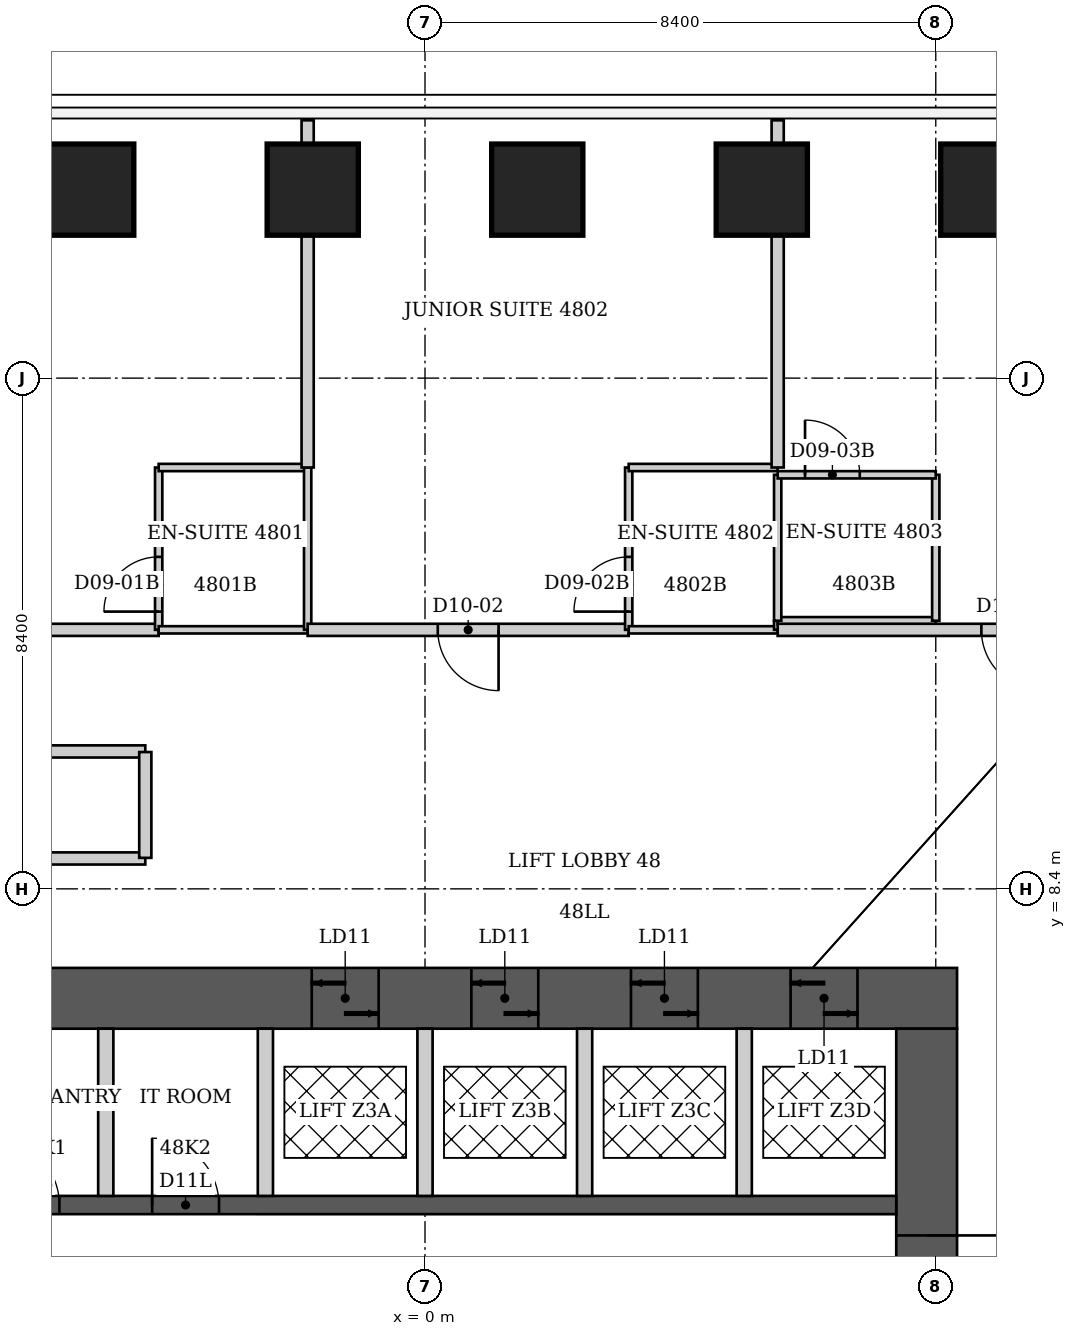
"""IFC4 building model, lengths in metres.
Left out: names, types, materials, properties, quantities, classifications, styles, units other than length and angle.
Written with IfcOpenShell. Run it as: python <this file> out.ifc"""

import sys

from ifc_helpers import new_model, si_unit, direction, frame, frame_2d, origin, origin_2d, place, context, subcontext, project, spatial, rectangle, extrude, element, fill, save


model = new_model("IFC4")
c1 = context("Model", 3, precision=1e-05, world=origin(), true_north=direction((0.0, 1.0)))
c2 = subcontext(c1, "Body", "Model", "MODEL_VIEW")
j1 = project(units=[si_unit("LENGTHUNIT", "METRE"), si_unit("PLANEANGLEUNIT", "RADIAN")], contexts=[c1])
p1 = place(None, origin())
s1 = spatial("IfcSite", under=j1, at=p1, CompositionType="ELEMENT")
p2 = place(p1, origin())
s2 = spatial("IfcBuilding", under=s1, at=p2, CompositionType="ELEMENT")
p3 = place(p2, frame((0.0, 0.0, 194.6)))
s3 = spatial("IfcBuildingStorey", under=s2, at=p3, CompositionType="ELEMENT", Elevation=194.6)
for number, where, z_axis, x_axis in (
    (1, (-5.539, 19.9, 0.0), (0.0, 0.0, 1.0), (0.0, 1.0, 0.0)),
    (2, (-1.846, 19.9, 0.0), (0.0, 0.0, 1.0), (0.0, 1.0, 0.0)),
    (3, (1.846, 19.9, 0.0), (0.0, 0.0, 1.0), (0.0, 1.0, 0.0)),
    (4, (5.539, 19.9, 0.0), (0.0, 0.0, 1.0), (0.0, 1.0, 0.0)),
    (5, (9.231, 19.9, 0.0), (0.0, 0.0, 1.0), (0.0, 1.0, 0.0)),
):
    element("IfcColumn", number, at=place(p3, frame(where, z_axis=z_axis, x_axis=x_axis)), inside=s3, PredefinedType="COLUMN", context=c2, shape_type="SweptSolid", body=[
        extrude(rectangle(XDim=1.5, YDim=1.5, at=origin_2d()), origin(), (0.0, 0.0, 1.0), 3.8),
    ])
p4 = place(p3, frame((-8.75, 6.6, 0.0), z_axis=(0.0, 0.0, 1.0), x_axis=(1.0, 0.0, 0.0)))
e6 = element("IfcWall", 6, at=p4, inside=s3, PredefinedType="SHEAR", context=c2, shape_type="SweptSolid", body=[
    extrude(rectangle(XDim=17.5, YDim=1.0, at=frame_2d((8.75, 0.0))), origin(), (0.0, 0.0, 1.0), 3.8),
])
p5 = place(p4, frame((6.887, 0.0, 0.0)))
e7 = element("IfcOpeningElement", 7, at=p5, cuts=e6, PredefinedType="OPENING", context=c2, shape_type="SweptSolid", body=[
    extrude(rectangle(XDim=1.1, YDim=2.1, at=frame_2d((0.55, 1.05))), frame((0.0, 0.5, 0.0), z_axis=(0.0, -1.0, 0.0), x_axis=(1.0, 0.0, 0.0)), (0.0, 0.0, 1.0), 1.0),
])
p6 = place(p4, frame((9.512, 0.0, 0.0)))
e8 = element("IfcOpeningElement", 8, at=p6, cuts=e6, PredefinedType="OPENING", context=c2, shape_type="SweptSolid", body=[
    extrude(rectangle(XDim=1.1, YDim=2.1, at=frame_2d((0.55, 1.05))), frame((0.0, 0.5, 0.0), z_axis=(0.0, -1.0, 0.0), x_axis=(1.0, 0.0, 0.0)), (0.0, 0.0, 1.0), 1.0),
])
p7 = place(p4, frame((12.137, 0.0, 0.0)))
e9 = element("IfcOpeningElement", 9, at=p7, cuts=e6, PredefinedType="OPENING", context=c2, shape_type="SweptSolid", body=[
    extrude(rectangle(XDim=1.1, YDim=2.1, at=frame_2d((0.55, 1.05))), frame((0.0, 0.5, 0.0), z_axis=(0.0, -1.0, 0.0), x_axis=(1.0, 0.0, 0.0)), (0.0, 0.0, 1.0), 1.0),
])
p8 = place(p4, frame((14.762, 0.0, 0.0)))
e10 = element("IfcOpeningElement", 10, at=p8, cuts=e6, PredefinedType="OPENING", context=c2, shape_type="SweptSolid", body=[
    extrude(rectangle(XDim=1.1, YDim=2.1, at=frame_2d((0.55, 1.05))), frame((0.0, 0.5, 0.0), z_axis=(0.0, -1.0, 0.0), x_axis=(1.0, 0.0, 0.0)), (0.0, 0.0, 1.0), 1.0),
])
p9 = place(p3, frame((8.25, -6.1, 0.0), z_axis=(0.0, 0.0, 1.0), x_axis=(0.0, 1.0, 0.0)))
e11 = element("IfcWall", 11, at=p9, inside=s3, PredefinedType="SHEAR", context=c2, shape_type="SweptSolid", body=[
    extrude(rectangle(XDim=12.2, YDim=1.0, at=frame_2d((6.1, 0.0))), origin(), (0.0, 0.0, 1.0), 3.8),
])
p10 = place(p9, frame((7.6, 0.0, 0.0)))
e12 = element("IfcOpeningElement", 12, at=p10, cuts=e11, PredefinedType="OPENING", context=c2, shape_type="SweptSolid", body=[
    extrude(rectangle(XDim=1.2, YDim=2.2, at=frame_2d((0.6, 1.1))), frame((0.0, 0.5, 0.0), z_axis=(0.0, -1.0, 0.0), x_axis=(1.0, 0.0, 0.0)), (0.0, 0.0, 1.0), 1.0),
])
p11 = place(p3, frame((-7.75, 3.2, 0.0), z_axis=(0.0, 0.0, 1.0), x_axis=(1.0, 0.0, 0.0)))
e13 = element("IfcWall", 13, at=p11, inside=s3, PredefinedType="SHEAR", context=c2, shape_type="SweptSolid", body=[
    extrude(rectangle(XDim=15.5, YDim=0.3, at=frame_2d((7.75, 0.0))), origin(), (0.0, 0.0, 1.0), 3.8),
])
p12 = place(p11, frame((0.637, 0.0, 0.0)))
e14 = element("IfcOpeningElement", 14, at=p12, cuts=e13, PredefinedType="OPENING", context=c2, shape_type="SweptSolid", body=[
    extrude(rectangle(XDim=1.1, YDim=2.2, at=frame_2d((0.55, 1.1))), frame((0.0, 0.15, 0.0), z_axis=(0.0, -1.0, 0.0), x_axis=(1.0, 0.0, 0.0)), (0.0, 0.0, 1.0), 0.3),
])
p13 = place(p11, frame((3.262, 0.0, 0.0)))
e15 = element("IfcOpeningElement", 15, at=p13, cuts=e13, PredefinedType="OPENING", context=c2, shape_type="SweptSolid", body=[
    extrude(rectangle(XDim=1.1, YDim=2.2, at=frame_2d((0.55, 1.1))), frame((0.0, 0.15, 0.0), z_axis=(0.0, -1.0, 0.0), x_axis=(1.0, 0.0, 0.0)), (0.0, 0.0, 1.0), 0.3),
])
for number, where, z_axis, x_axis in (
    (16, (-5.25, 3.35, 0.0), (0.0, 0.0, 1.0), (0.0, 1.0, 0.0)),
    (17, (-2.625, 3.35, 0.0), (0.0, 0.0, 1.0), (0.0, 1.0, 0.0)),
    (18, (0.0, 3.35, 0.0), (0.0, 0.0, 1.0), (0.0, 1.0, 0.0)),
    (19, (2.625, 3.35, 0.0), (0.0, 0.0, 1.0), (0.0, 1.0, 0.0)),
    (20, (5.25, 3.35, 0.0), (0.0, 0.0, 1.0), (0.0, 1.0, 0.0)),
):
    element("IfcWall", number, at=place(p3, frame(where, z_axis=z_axis, x_axis=x_axis)), inside=s3, PredefinedType="PARTITIONING", context=c2, shape_type="SweptSolid", body=[
        extrude(rectangle(XDim=2.75, YDim=0.25, at=frame_2d((1.375, 0.0))), origin(), (0.0, 0.0, 1.0), 3.8),
    ])
p14 = place(p3, frame((-12.35, 10.66, 0.0), z_axis=(0.0, 0.0, 1.0), x_axis=(1.0, 0.0, 0.0)))
e21 = element("IfcWall", 21, at=p14, inside=s3, PredefinedType="PARTITIONING", context=c2, shape_type="SweptSolid", body=[
    extrude(rectangle(XDim=7.75, YDim=0.2, at=frame_2d((3.875, 0.0))), origin(), (0.0, 0.0, 1.0), 3.64),
])
p15 = place(p14, frame((3.325, 0.0, 0.0)))
e22 = element("IfcOpeningElement", 22, at=p15, cuts=e21, PredefinedType="OPENING", context=c2, shape_type="SweptSolid", body=[
    extrude(rectangle(XDim=1.1, YDim=2.2, at=frame_2d((0.55, 1.1))), frame((0.0, 0.1, 0.0), z_axis=(0.0, -1.0, 0.0), x_axis=(1.0, 0.0, 0.0)), (0.0, 0.0, 1.0), 0.2),
])
p16 = place(p3, frame((-4.6, 8.9, 0.0), z_axis=(0.0, 0.0, 1.0), x_axis=(-1.0, 0.0, 0.0)))
e23 = element("IfcWall", 23, at=p16, inside=s3, PredefinedType="PARTITIONING", context=c2, shape_type="SweptSolid", body=[
    extrude(rectangle(XDim=5.95, YDim=0.2, at=frame_2d((2.975, 0.0))), origin(), (0.0, 0.0, 1.0), 3.64),
])
p17 = place(p3, frame((-4.6, 10.65, 0.0), z_axis=(0.0, 0.0, 1.0), x_axis=(0.0, -1.0, 0.0)))
e24 = element("IfcWall", 24, at=p17, inside=s3, PredefinedType="PARTITIONING", context=c2, shape_type="SweptSolid", body=[
    extrude(rectangle(XDim=1.74, YDim=0.2, at=frame_2d((0.87, 0.0))), origin(), (0.0, 0.0, 1.0), 3.64),
])
p18 = place(p3, frame((-4.38, 12.66, 0.0), z_axis=(0.0, 0.0, 1.0), x_axis=(-1.0, 0.0, 0.0)))
e25 = element("IfcWall", 25, at=p18, inside=s3, PredefinedType="PARTITIONING", context=c2, shape_type="SweptSolid", body=[
    extrude(rectangle(XDim=6.58, YDim=0.2, at=frame_2d((3.29, 0.0))), origin(), (0.0, 0.0, 1.0), 3.64),
])
p19 = place(p18, frame((2.79, 0.0, 0.0)))
e26 = element("IfcOpeningElement", 26, at=p19, cuts=e25, PredefinedType="OPENING", context=c2, shape_type="SweptSolid", body=[
    extrude(rectangle(XDim=1.0, YDim=2.13, at=frame_2d((0.5, 1.065))), frame((0.0, 0.1, 0.0), z_axis=(0.0, -1.0, 0.0), x_axis=(1.0, 0.0, 0.0)), (0.0, 0.0, 1.0), 0.2),
])
p20 = place(p3, frame((-4.38, 15.33, 0.0), z_axis=(0.0, 0.0, 1.0), x_axis=(0.0, -1.0, 0.0)))
e27 = element("IfcWall", 27, at=p20, inside=s3, PredefinedType="PARTITIONING", context=c2, shape_type="SweptSolid", body=[
    extrude(rectangle(XDim=2.67, YDim=0.12, at=frame_2d((1.335, 0.0))), origin(), (0.0, 0.0, 1.0), 3.64),
])
p21 = place(p20, frame((1.47, 0.0, 0.0)))
e28 = element("IfcOpeningElement", 28, at=p21, cuts=e27, PredefinedType="OPENING", context=c2, shape_type="SweptSolid", body=[
    extrude(rectangle(XDim=0.9, YDim=2.03, at=frame_2d((0.45, 1.015))), frame((0.0, 0.06, 0.0), z_axis=(0.0, -1.0, 0.0), x_axis=(1.0, 0.0, 0.0)), (0.0, 0.0, 1.0), 0.12),
])
for number, where, z_axis, x_axis in (
    (29, (-1.93, 12.66, 0.0), (0.0, 0.0, 1.0), (-1.0, 0.0, 0.0)),
    (30, (-1.93, 15.33, 0.0), (0.0, 0.0, 1.0), (-1.0, 0.0, 0.0)),
):
    element("IfcWall", number, at=place(p3, frame(where, z_axis=z_axis, x_axis=x_axis)), inside=s3, PredefinedType="PARTITIONING", context=c2, shape_type="SweptSolid", body=[
        extrude(rectangle(XDim=2.45, YDim=0.12, at=frame_2d((1.225, 0.0))), origin(), (0.0, 0.0, 1.0), 3.64),
    ])
p22 = place(p3, frame((-1.93, 15.33, 0.0), z_axis=(0.0, 0.0, 1.0), x_axis=(0.0, -1.0, 0.0)))
e31 = element("IfcWall", 31, at=p22, inside=s3, PredefinedType="PARTITIONING", context=c2, shape_type="SweptSolid", body=[
    extrude(rectangle(XDim=2.67, YDim=0.12, at=frame_2d((1.335, 0.0))), origin(), (0.0, 0.0, 1.0), 3.023),
])
p23 = place(p3, frame((-1.93, 21.04, 0.0), z_axis=(0.0, 0.0, 1.0), x_axis=(0.0, -1.0, 0.0)))
e32 = element("IfcWall", 32, at=p23, inside=s3, PredefinedType="PARTITIONING", context=c2, shape_type="SweptSolid", body=[
    extrude(rectangle(XDim=5.71, YDim=0.2, at=frame_2d((2.855, 0.0))), origin(), (0.0, 0.0, 1.0), 3.023),
])
p24 = place(p3, frame((3.35, 12.66, 0.0), z_axis=(0.0, 0.0, 1.0), x_axis=(-1.0, 0.0, 0.0)))
e33 = element("IfcWall", 33, at=p24, inside=s3, PredefinedType="PARTITIONING", context=c2, shape_type="SweptSolid", body=[
    extrude(rectangle(XDim=5.28, YDim=0.2, at=frame_2d((2.64, 0.0))), origin(), (0.0, 0.0, 1.0), 3.64),
])
p25 = place(p24, frame((2.14, 0.0, 0.0)))
e34 = element("IfcOpeningElement", 34, at=p25, cuts=e33, PredefinedType="OPENING", context=c2, shape_type="SweptSolid", body=[
    extrude(rectangle(XDim=1.0, YDim=2.13, at=frame_2d((0.5, 1.065))), frame((0.0, 0.1, 0.0), z_axis=(0.0, -1.0, 0.0), x_axis=(1.0, 0.0, 0.0)), (0.0, 0.0, 1.0), 0.2),
])
p26 = place(p3, frame((3.35, 15.33, 0.0), z_axis=(0.0, 0.0, 1.0), x_axis=(0.0, -1.0, 0.0)))
e35 = element("IfcWall", 35, at=p26, inside=s3, PredefinedType="PARTITIONING", context=c2, shape_type="SweptSolid", body=[
    extrude(rectangle(XDim=2.67, YDim=0.12, at=frame_2d((1.335, 0.0))), origin(), (0.0, 0.0, 1.0), 3.64),
])
p27 = place(p26, frame((1.47, 0.0, 0.0)))
e36 = element("IfcOpeningElement", 36, at=p27, cuts=e35, PredefinedType="OPENING", context=c2, shape_type="SweptSolid", body=[
    extrude(rectangle(XDim=0.9, YDim=2.03, at=frame_2d((0.45, 1.015))), frame((0.0, 0.06, 0.0), z_axis=(0.0, -1.0, 0.0), x_axis=(1.0, 0.0, 0.0)), (0.0, 0.0, 1.0), 0.12),
])
p28 = place(p3, frame((5.8, 12.66, 0.0), z_axis=(0.0, 0.0, 1.0), x_axis=(-1.0, 0.0, 0.0)))
e37 = element("IfcWall", 37, at=p28, inside=s3, PredefinedType="PARTITIONING", context=c2, shape_type="SweptSolid", body=[
    extrude(rectangle(XDim=2.45, YDim=0.12, at=frame_2d((1.225, 0.0))), origin(), (0.0, 0.0, 1.0), 3.64),
])
p29 = place(p3, frame((5.8, 12.81, 0.0), z_axis=(0.0, 0.0, 1.0), x_axis=(0.0, -1.0, 0.0)))
e38 = element("IfcWall", 38, at=p29, inside=s3, PredefinedType="PARTITIONING", context=c2, shape_type="SweptSolid", body=[
    extrude(rectangle(XDim=0.15, YDim=0.12, at=frame_2d((0.075, 0.0))), origin(), (0.0, 0.0, 1.0), 3.64),
])
p30 = place(p3, frame((5.8, 12.81, 0.0), z_axis=(0.0, 0.0, 1.0), x_axis=(1.0, 0.0, 0.0)))
e39 = element("IfcWall", 39, at=p30, inside=s3, PredefinedType="PARTITIONING", context=c2, shape_type="SweptSolid", body=[
    extrude(rectangle(XDim=2.6, YDim=0.12, at=frame_2d((1.3, 0.0))), origin(), (0.0, 0.0, 1.0), 3.64),
])
p31 = place(p3, frame((5.8, 15.21, 0.0), z_axis=(0.0, 0.0, 1.0), x_axis=(0.0, -1.0, 0.0)))
e40 = element("IfcWall", 40, at=p31, inside=s3, PredefinedType="PARTITIONING", context=c2, shape_type="SweptSolid", body=[
    extrude(rectangle(XDim=2.4, YDim=0.12, at=frame_2d((1.2, 0.0))), origin(), (0.0, 0.0, 1.0), 3.64),
])
p32 = place(p3, frame((5.8, 15.33, 0.0), z_axis=(0.0, 0.0, 1.0), x_axis=(-1.0, 0.0, 0.0)))
e41 = element("IfcWall", 41, at=p32, inside=s3, PredefinedType="PARTITIONING", context=c2, shape_type="SweptSolid", body=[
    extrude(rectangle(XDim=2.45, YDim=0.12, at=frame_2d((1.225, 0.0))), origin(), (0.0, 0.0, 1.0), 3.64),
])
p33 = place(p3, frame((5.8, 21.04, 0.0), z_axis=(0.0, 0.0, 1.0), x_axis=(0.0, -1.0, 0.0)))
e42 = element("IfcWall", 42, at=p33, inside=s3, PredefinedType="PARTITIONING", context=c2, shape_type="SweptSolid", body=[
    extrude(rectangle(XDim=5.71, YDim=0.2, at=frame_2d((2.855, 0.0))), origin(), (0.0, 0.0, 1.0), 3.64),
])
p34 = place(p3, frame((8.4, 12.81, 0.0), z_axis=(0.0, 0.0, 1.0), x_axis=(0.0, 1.0, 0.0)))
e43 = element("IfcWall", 43, at=p34, inside=s3, PredefinedType="PARTITIONING", context=c2, shape_type="SweptSolid", body=[
    extrude(rectangle(XDim=2.4, YDim=0.12, at=frame_2d((1.2, 0.0))), origin(), (0.0, 0.0, 1.0), 3.64),
])
p35 = place(p3, frame((8.4, 15.21, 0.0), z_axis=(0.0, 0.0, 1.0), x_axis=(-1.0, 0.0, 0.0)))
e44 = element("IfcWall", 44, at=p35, inside=s3, PredefinedType="PARTITIONING", context=c2, shape_type="SweptSolid", body=[
    extrude(rectangle(XDim=2.6, YDim=0.12, at=frame_2d((1.3, 0.0))), origin(), (0.0, 0.0, 1.0), 3.64),
])
p36 = place(p35, frame((1.25, 0.0, 0.0)))
e45 = element("IfcOpeningElement", 45, at=p36, cuts=e44, PredefinedType="OPENING", context=c2, shape_type="SweptSolid", body=[
    extrude(rectangle(XDim=0.9, YDim=2.03, at=frame_2d((0.45, 1.015))), frame((0.0, 0.06, 0.0), z_axis=(0.0, -1.0, 0.0), x_axis=(1.0, 0.0, 0.0)), (0.0, 0.0, 1.0), 0.12),
])
p37 = place(p3, frame((13.5, 12.66, 0.0), z_axis=(0.0, 0.0, 1.0), x_axis=(-1.0, 0.0, 0.0)))
e46 = element("IfcWall", 46, at=p37, inside=s3, PredefinedType="PARTITIONING", context=c2, shape_type="SweptSolid", body=[
    extrude(rectangle(XDim=7.7, YDim=0.2, at=frame_2d((3.85, 0.0))), origin(), (0.0, 0.0, 1.0), 3.64),
])
p38 = place(p37, frame((3.35, 0.0, 0.0)))
e47 = element("IfcOpeningElement", 47, at=p38, cuts=e46, PredefinedType="OPENING", context=c2, shape_type="SweptSolid", body=[
    extrude(rectangle(XDim=1.0, YDim=2.13, at=frame_2d((0.5, 1.065))), frame((0.0, 0.1, 0.0), z_axis=(0.0, -1.0, 0.0), x_axis=(1.0, 0.0, 0.0)), (0.0, 0.0, 1.0), 0.2),
])
p39 = place(p21, origin())
e48 = element("IfcDoor", 48, at=p39, inside=s3, OperationType="SINGLE_SWING_RIGHT", PredefinedType="DOOR", context=c2, shape_type="SweptSolid", body=[
    extrude(rectangle(XDim=0.9, YDim=2.03, at=frame_2d((0.45, 1.015))), frame((0.0, 0.025, 0.0), z_axis=(0.0, -1.0, 0.0), x_axis=(1.0, 0.0, 0.0)), (0.0, 0.0, 1.0), 0.05),
])
fill(e28, e48)
p40 = place(p25, origin())
e49 = element("IfcDoor", 49, at=p40, inside=s3, OperationType="SINGLE_SWING_LEFT", PredefinedType="DOOR", context=c2, shape_type="SweptSolid", body=[
    extrude(rectangle(XDim=1.0, YDim=2.13, at=frame_2d((0.5, 1.065))), frame((0.0, 0.025, 0.0), z_axis=(0.0, -1.0, 0.0), x_axis=(1.0, 0.0, 0.0)), (0.0, 0.0, 1.0), 0.05),
])
fill(e34, e49)
p41 = place(p27, origin())
e50 = element("IfcDoor", 50, at=p41, inside=s3, OperationType="SINGLE_SWING_RIGHT", PredefinedType="DOOR", context=c2, shape_type="SweptSolid", body=[
    extrude(rectangle(XDim=0.9, YDim=2.03, at=frame_2d((0.45, 1.015))), frame((0.0, 0.025, 0.0), z_axis=(0.0, -1.0, 0.0), x_axis=(1.0, 0.0, 0.0)), (0.0, 0.0, 1.0), 0.05),
])
fill(e36, e50)
p42 = place(p38, origin())
e51 = element("IfcDoor", 51, at=p42, inside=s3, OperationType="SINGLE_SWING_LEFT", PredefinedType="DOOR", context=c2, shape_type="SweptSolid", body=[
    extrude(rectangle(XDim=1.0, YDim=2.13, at=frame_2d((0.5, 1.065))), frame((0.0, 0.025, 0.0), z_axis=(0.0, -1.0, 0.0), x_axis=(1.0, 0.0, 0.0)), (0.0, 0.0, 1.0), 0.05),
])
fill(e47, e51)
p43 = place(p36, origin())
e52 = element("IfcDoor", 52, at=p43, inside=s3, OperationType="SINGLE_SWING_RIGHT", PredefinedType="DOOR", context=c2, shape_type="SweptSolid", body=[
    extrude(rectangle(XDim=0.9, YDim=2.03, at=frame_2d((0.45, 1.015))), frame((0.0, 0.025, 0.0), z_axis=(0.0, -1.0, 0.0), x_axis=(1.0, 0.0, 0.0)), (0.0, 0.0, 1.0), 0.05),
])
fill(e45, e52)
p44 = place(p10, origin())
e53 = element("IfcDoor", 53, at=p44, inside=s3, OperationType="SINGLE_SWING_RIGHT", PredefinedType="DOOR", context=c2, shape_type="SweptSolid", body=[
    extrude(rectangle(XDim=1.2, YDim=2.2, at=frame_2d((0.6, 1.1))), frame((0.0, 0.025, 0.0), z_axis=(0.0, -1.0, 0.0), x_axis=(1.0, 0.0, 0.0)), (0.0, 0.0, 1.0), 0.05),
])
fill(e12, e53)
p45 = place(p12, origin())
e54 = element("IfcDoor", 54, at=p45, inside=s3, OperationType="SINGLE_SWING_LEFT", PredefinedType="DOOR", context=c2, shape_type="SweptSolid", body=[
    extrude(rectangle(XDim=1.1, YDim=2.2, at=frame_2d((0.55, 1.1))), frame((0.0, 0.025, 0.0), z_axis=(0.0, -1.0, 0.0), x_axis=(1.0, 0.0, 0.0)), (0.0, 0.0, 1.0), 0.05),
])
fill(e14, e54)
p46 = place(p13, origin())
e55 = element("IfcDoor", 55, at=p46, inside=s3, OperationType="SINGLE_SWING_LEFT", PredefinedType="DOOR", context=c2, shape_type="SweptSolid", body=[
    extrude(rectangle(XDim=1.1, YDim=2.2, at=frame_2d((0.55, 1.1))), frame((0.0, 0.025, 0.0), z_axis=(0.0, -1.0, 0.0), x_axis=(1.0, 0.0, 0.0)), (0.0, 0.0, 1.0), 0.05),
])
fill(e15, e55)
p47 = place(p5, origin())
e56 = element("IfcDoor", 56, at=p47, inside=s3, OperationType="DOUBLE_DOOR_SLIDING", PredefinedType="DOOR", context=c2, shape_type="SweptSolid", body=[
    extrude(rectangle(XDim=1.1, YDim=2.1, at=frame_2d((0.55, 1.05))), frame((0.0, 0.025, 0.0), z_axis=(0.0, -1.0, 0.0), x_axis=(1.0, 0.0, 0.0)), (0.0, 0.0, 1.0), 0.05),
])
fill(e7, e56)
p48 = place(p6, origin())
e57 = element("IfcDoor", 57, at=p48, inside=s3, OperationType="DOUBLE_DOOR_SLIDING", PredefinedType="DOOR", context=c2, shape_type="SweptSolid", body=[
    extrude(rectangle(XDim=1.1, YDim=2.1, at=frame_2d((0.55, 1.05))), frame((0.0, 0.025, 0.0), z_axis=(0.0, -1.0, 0.0), x_axis=(1.0, 0.0, 0.0)), (0.0, 0.0, 1.0), 0.05),
])
fill(e8, e57)
p49 = place(p7, origin())
e58 = element("IfcDoor", 58, at=p49, inside=s3, OperationType="DOUBLE_DOOR_SLIDING", PredefinedType="DOOR", context=c2, shape_type="SweptSolid", body=[
    extrude(rectangle(XDim=1.1, YDim=2.1, at=frame_2d((0.55, 1.05))), frame((0.0, 0.025, 0.0), z_axis=(0.0, -1.0, 0.0), x_axis=(1.0, 0.0, 0.0)), (0.0, 0.0, 1.0), 0.05),
])
fill(e9, e58)
p50 = place(p8, origin())
e59 = element("IfcDoor", 59, at=p50, inside=s3, OperationType="DOUBLE_DOOR_SLIDING", PredefinedType="DOOR", context=c2, shape_type="SweptSolid", body=[
    extrude(rectangle(XDim=1.1, YDim=2.1, at=frame_2d((0.55, 1.05))), frame((0.0, 0.025, 0.0), z_axis=(0.0, -1.0, 0.0), x_axis=(1.0, 0.0, 0.0)), (0.0, 0.0, 1.0), 0.05),
])
fill(e10, e59)
save(model, sys.argv[1])
